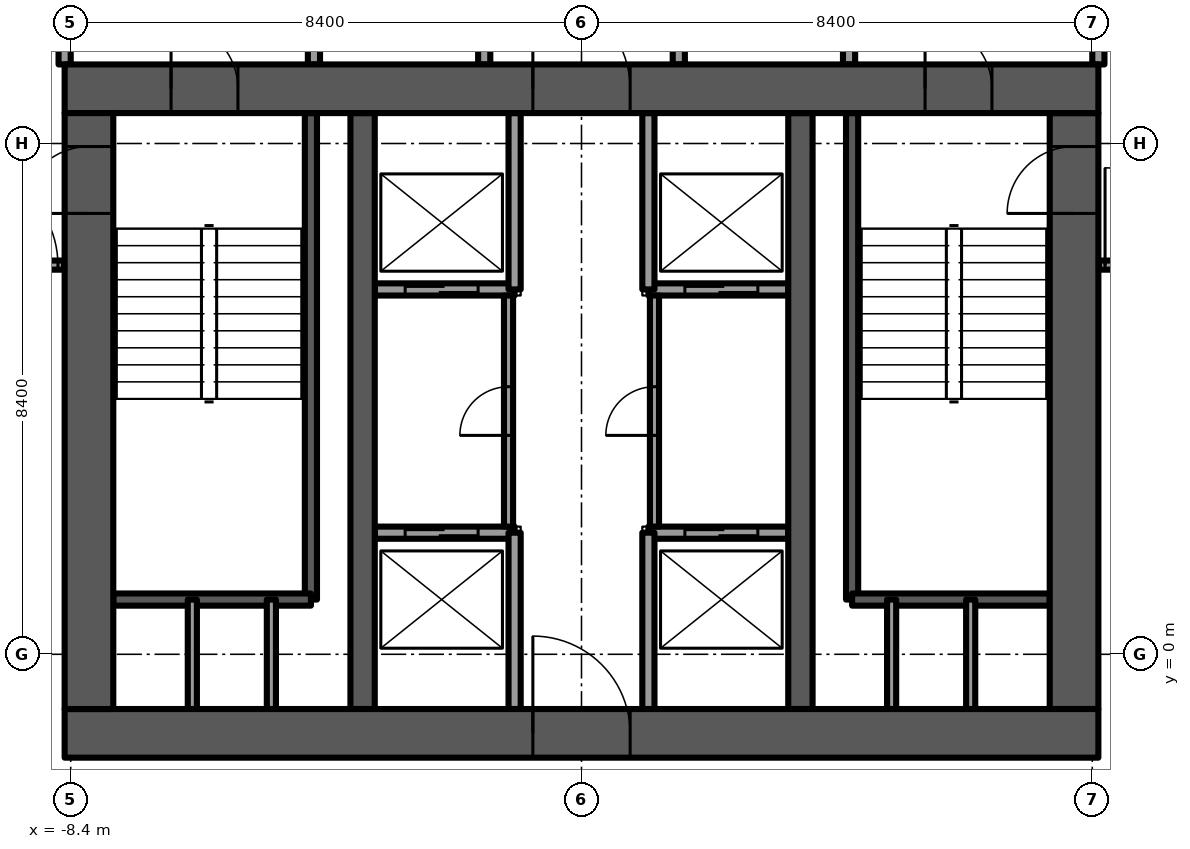
"""IFC4 building model, lengths in metres.
Left out: names, types, materials, properties, quantities, classifications, styles, units other than length and angle.
Written with IfcOpenShell. Run it as: python <this file> out.ifc"""

import sys

from ifc_helpers import new_model, si_unit, direction, frame, frame_2d, origin, place, context, subcontext, project, spatial, rectangle, extrude, element, fill, save


model = new_model("IFC4")
c1 = context("Model", 3, precision=1e-05, world=origin(), true_north=direction((0.0, 1.0)))
c2 = subcontext(c1, "Body", "Model", "MODEL_VIEW")
j1 = project(units=[si_unit("LENGTHUNIT", "METRE"), si_unit("PLANEANGLEUNIT", "RADIAN")], contexts=[c1])
p1 = place(None, origin())
s1 = spatial("IfcSite", under=j1, at=p1, CompositionType="ELEMENT")
p2 = place(p1, origin())
s2 = spatial("IfcBuilding", under=s1, at=p2, CompositionType="ELEMENT")
p3 = place(p2, frame((0.0, 0.0, 194.5)))
s3 = spatial("IfcBuildingStorey", under=s2, at=p3, CompositionType="ELEMENT", Elevation=194.5)
p4 = place(p3, frame((-8.5, -1.3, -0.3), z_axis=(0.0, 0.0, 1.0), x_axis=(1.0, 0.0, 0.0)))
e1 = element("IfcWall", 1, at=p4, inside=s3, PredefinedType="SHEAR", context=c2, shape_type="SweptSolid", body=[
    extrude(rectangle(XDim=17.0, YDim=0.8, at=frame_2d((8.5, 0.0))), origin(), (0.0, 0.0, 1.0), 3.75),
])
p5 = place(p4, frame((7.7, 0.0, 0.0)))
e2 = element("IfcOpeningElement", 2, at=p5, cuts=e1, PredefinedType="OPENING", context=c2, shape_type="SweptSolid", body=[
    extrude(rectangle(XDim=1.6, YDim=2.1, at=frame_2d((0.8, 1.05))), frame((0.0, 0.4, 0.0), z_axis=(0.0, -1.0, 0.0), x_axis=(1.0, 0.0, 0.0)), (0.0, 0.0, 1.0), 0.8),
])
p6 = place(p3, frame((-8.5, 9.3, -0.3), z_axis=(0.0, 0.0, 1.0), x_axis=(1.0, 0.0, 0.0)))
e3 = element("IfcWall", 3, at=p6, inside=s3, PredefinedType="SHEAR", context=c2, shape_type="SweptSolid", body=[
    extrude(rectangle(XDim=17.0, YDim=0.8, at=frame_2d((8.5, 0.0))), origin(), (0.0, 0.0, 1.0), 3.75),
])
p7 = place(p6, frame((7.7, 0.0, 0.0)))
e4 = element("IfcOpeningElement", 4, at=p7, cuts=e3, PredefinedType="OPENING", context=c2, shape_type="SweptSolid", body=[
    extrude(rectangle(XDim=1.6, YDim=2.1, at=frame_2d((0.8, 1.05))), frame((0.0, 0.4, 0.0), z_axis=(0.0, -1.0, 0.0), x_axis=(1.0, 0.0, 0.0)), (0.0, 0.0, 1.0), 0.8),
])
p8 = place(p6, frame((1.75, 0.0, 0.0)))
e5 = element("IfcOpeningElement", 5, at=p8, cuts=e3, PredefinedType="OPENING", context=c2, shape_type="SweptSolid", body=[
    extrude(rectangle(XDim=1.1, YDim=2.1, at=frame_2d((0.55, 1.05))), frame((0.0, 0.4, 0.0), z_axis=(0.0, -1.0, 0.0), x_axis=(1.0, 0.0, 0.0)), (0.0, 0.0, 1.0), 0.8),
])
p9 = place(p6, frame((14.15, 0.0, 0.0)))
e6 = element("IfcOpeningElement", 6, at=p9, cuts=e3, PredefinedType="OPENING", context=c2, shape_type="SweptSolid", body=[
    extrude(rectangle(XDim=1.1, YDim=2.1, at=frame_2d((0.55, 1.05))), frame((0.0, 0.4, 0.0), z_axis=(0.0, -1.0, 0.0), x_axis=(1.0, 0.0, 0.0)), (0.0, 0.0, 1.0), 0.8),
])
p10 = place(p3, frame((-8.1, -0.9, -0.3), z_axis=(0.0, 0.0, 1.0), x_axis=(0.0, 1.0, 0.0)))
e7 = element("IfcWall", 7, at=p10, inside=s3, PredefinedType="SHEAR", context=c2, shape_type="SweptSolid", body=[
    extrude(rectangle(XDim=9.8, YDim=0.8, at=frame_2d((4.9, 0.0))), origin(), (0.0, 0.0, 1.0), 3.75),
])
p11 = place(p10, frame((8.15, 0.0, 0.0)))
e8 = element("IfcOpeningElement", 8, at=p11, cuts=e7, PredefinedType="OPENING", context=c2, shape_type="SweptSolid", body=[
    extrude(rectangle(XDim=1.1, YDim=2.1, at=frame_2d((0.55, 1.05))), frame((0.0, 0.4, 0.0), z_axis=(0.0, -1.0, 0.0), x_axis=(1.0, 0.0, 0.0)), (0.0, 0.0, 1.0), 0.8),
])
p12 = place(p3, frame((8.1, -0.9, -0.3), z_axis=(0.0, 0.0, 1.0), x_axis=(0.0, 1.0, 0.0)))
e9 = element("IfcWall", 9, at=p12, inside=s3, PredefinedType="SHEAR", context=c2, shape_type="SweptSolid", body=[
    extrude(rectangle(XDim=9.8, YDim=0.8, at=frame_2d((4.9, 0.0))), origin(), (0.0, 0.0, 1.0), 3.75),
])
p13 = place(p12, frame((8.15, 0.0, 0.0)))
e10 = element("IfcOpeningElement", 10, at=p13, cuts=e9, PredefinedType="OPENING", context=c2, shape_type="SweptSolid", body=[
    extrude(rectangle(XDim=1.1, YDim=2.1, at=frame_2d((0.55, 1.05))), frame((0.0, 0.4, 0.0), z_axis=(0.0, -1.0, 0.0), x_axis=(1.0, 0.0, 0.0)), (0.0, 0.0, 1.0), 0.8),
])
for number, where, z_axis, x_axis in (
    (11, (-3.6, -0.9, -0.3), (0.0, 0.0, 1.0), (0.0, 1.0, 0.0)),
    (12, (3.6, -0.9, -0.3), (0.0, 0.0, 1.0), (0.0, 1.0, 0.0)),
):
    element("IfcWall", number, at=place(p3, frame(where, z_axis=z_axis, x_axis=x_axis)), inside=s3, PredefinedType="SHEAR", context=c2, shape_type="SweptSolid", body=[
        extrude(rectangle(XDim=9.8, YDim=0.4, at=frame_2d((4.9, 0.0))), origin(), (0.0, 0.0, 1.0), 3.75),
    ])
p14 = place(p3, frame((-3.4, 2.0, 0.0), z_axis=(0.0, 0.0, 1.0), x_axis=(1.0, 0.0, 0.0)))
e13 = element("IfcWall", 13, at=p14, inside=s3, PredefinedType="PARTITIONING", context=c2, shape_type="SweptSolid", body=[
    extrude(rectangle(XDim=2.3, YDim=0.2, at=frame_2d((1.15, 0.0))), origin(), (0.0, 0.0, 1.0), 3.45),
])
p15 = place(p14, frame((0.5, 0.0, 0.0)))
e14 = element("IfcOpeningElement", 14, at=p15, cuts=e13, PredefinedType="OPENING", context=c2, shape_type="SweptSolid", body=[
    extrude(rectangle(XDim=1.2, YDim=2.1, at=frame_2d((0.6, 1.05))), frame((0.0, 0.1, 0.0), z_axis=(0.0, -1.0, 0.0), x_axis=(1.0, 0.0, 0.0)), (0.0, 0.0, 1.0), 0.2),
])
p16 = place(p3, frame((-3.4, 6.0, 0.0), z_axis=(0.0, 0.0, 1.0), x_axis=(1.0, 0.0, 0.0)))
e15 = element("IfcWall", 15, at=p16, inside=s3, PredefinedType="PARTITIONING", context=c2, shape_type="SweptSolid", body=[
    extrude(rectangle(XDim=2.3, YDim=0.2, at=frame_2d((1.15, 0.0))), origin(), (0.0, 0.0, 1.0), 3.45),
])
p17 = place(p16, frame((0.5, 0.0, 0.0)))
e16 = element("IfcOpeningElement", 16, at=p17, cuts=e15, PredefinedType="OPENING", context=c2, shape_type="SweptSolid", body=[
    extrude(rectangle(XDim=1.2, YDim=2.1, at=frame_2d((0.6, 1.05))), frame((0.0, 0.1, 0.0), z_axis=(0.0, -1.0, 0.0), x_axis=(1.0, 0.0, 0.0)), (0.0, 0.0, 1.0), 0.2),
])
p18 = place(p3, frame((1.1, 2.0, 0.0), z_axis=(0.0, 0.0, 1.0), x_axis=(1.0, 0.0, 0.0)))
e17 = element("IfcWall", 17, at=p18, inside=s3, PredefinedType="PARTITIONING", context=c2, shape_type="SweptSolid", body=[
    extrude(rectangle(XDim=2.3, YDim=0.2, at=frame_2d((1.15, 0.0))), origin(), (0.0, 0.0, 1.0), 3.45),
])
p19 = place(p18, frame((0.6, 0.0, 0.0)))
e18 = element("IfcOpeningElement", 18, at=p19, cuts=e17, PredefinedType="OPENING", context=c2, shape_type="SweptSolid", body=[
    extrude(rectangle(XDim=1.2, YDim=2.1, at=frame_2d((0.6, 1.05))), frame((0.0, 0.1, 0.0), z_axis=(0.0, -1.0, 0.0), x_axis=(1.0, 0.0, 0.0)), (0.0, 0.0, 1.0), 0.2),
])
p20 = place(p3, frame((1.1, 6.0, 0.0), z_axis=(0.0, 0.0, 1.0), x_axis=(1.0, 0.0, 0.0)))
e19 = element("IfcWall", 19, at=p20, inside=s3, PredefinedType="PARTITIONING", context=c2, shape_type="SweptSolid", body=[
    extrude(rectangle(XDim=2.3, YDim=0.2, at=frame_2d((1.15, 0.0))), origin(), (0.0, 0.0, 1.0), 3.45),
])
p21 = place(p20, frame((0.6, 0.0, 0.0)))
e20 = element("IfcOpeningElement", 20, at=p21, cuts=e19, PredefinedType="OPENING", context=c2, shape_type="SweptSolid", body=[
    extrude(rectangle(XDim=1.2, YDim=2.1, at=frame_2d((0.6, 1.05))), frame((0.0, 0.1, 0.0), z_axis=(0.0, -1.0, 0.0), x_axis=(1.0, 0.0, 0.0)), (0.0, 0.0, 1.0), 0.2),
])
for number, where, z_axis, x_axis in (
    (21, (-1.1, -0.9, 0.0), (0.0, 0.0, 1.0), (0.0, 1.0, 0.0)),
    (22, (1.1, -0.9, 0.0), (0.0, 0.0, 1.0), (0.0, 1.0, 0.0)),
    (23, (-1.1, 6.0, 0.0), (0.0, 0.0, 1.0), (0.0, 1.0, 0.0)),
    (24, (1.1, 6.0, 0.0), (0.0, 0.0, 1.0), (0.0, 1.0, 0.0)),
):
    element("IfcWall", number, at=place(p3, frame(where, z_axis=z_axis, x_axis=x_axis)), inside=s3, PredefinedType="PARTITIONING", context=c2, shape_type="SweptSolid", body=[
        extrude(rectangle(XDim=2.9, YDim=0.2, at=frame_2d((1.45, 0.0))), origin(), (0.0, 0.0, 1.0), 3.45),
    ])
p22 = place(p3, frame((-4.45, 0.9, -0.3), z_axis=(0.0, 0.0, 1.0), x_axis=(0.0, 1.0, 0.0)))
e25 = element("IfcWall", 25, at=p22, inside=s3, PredefinedType="SOLIDWALL", context=c2, shape_type="SweptSolid", body=[
    extrude(rectangle(XDim=8.0, YDim=0.2, at=frame_2d((4.0, 0.0))), origin(), (0.0, 0.0, 1.0), 3.75),
])
p23 = place(p3, frame((-7.7, 0.9, -0.3), z_axis=(0.0, 0.0, 1.0), x_axis=(1.0, 0.0, 0.0)))
e26 = element("IfcWall", 26, at=p23, inside=s3, PredefinedType="SOLIDWALL", context=c2, shape_type="SweptSolid", body=[
    extrude(rectangle(XDim=3.25, YDim=0.2, at=frame_2d((1.625, 0.0))), origin(), (0.0, 0.0, 1.0), 3.75),
])
for number, where, z_axis, x_axis in (
    (27, (-6.4, -0.9, 0.0), (0.0, 0.0, 1.0), (0.0, 1.0, 0.0)),
    (28, (-5.1, -0.9, 0.0), (0.0, 0.0, 1.0), (0.0, 1.0, 0.0)),
):
    element("IfcWall", number, at=place(p3, frame(where, z_axis=z_axis, x_axis=x_axis)), inside=s3, PredefinedType="PARTITIONING", context=c2, shape_type="SweptSolid", body=[
        extrude(rectangle(XDim=1.8, YDim=0.15, at=frame_2d((0.9, 0.0))), origin(), (0.0, 0.0, 1.0), 3.45),
    ])
p24 = place(p3, frame((4.45, 0.9, -0.3), z_axis=(0.0, 0.0, 1.0), x_axis=(0.0, 1.0, 0.0)))
e29 = element("IfcWall", 29, at=p24, inside=s3, PredefinedType="SOLIDWALL", context=c2, shape_type="SweptSolid", body=[
    extrude(rectangle(XDim=8.0, YDim=0.2, at=frame_2d((4.0, 0.0))), origin(), (0.0, 0.0, 1.0), 3.75),
])
p25 = place(p3, frame((4.45, 0.9, -0.3), z_axis=(0.0, 0.0, 1.0), x_axis=(1.0, 0.0, 0.0)))
e30 = element("IfcWall", 30, at=p25, inside=s3, PredefinedType="SOLIDWALL", context=c2, shape_type="SweptSolid", body=[
    extrude(rectangle(XDim=3.25, YDim=0.2, at=frame_2d((1.625, 0.0))), origin(), (0.0, 0.0, 1.0), 3.75),
])
for number, where, z_axis, x_axis in (
    (31, (5.1, -0.9, 0.0), (0.0, 0.0, 1.0), (0.0, 1.0, 0.0)),
    (32, (6.4, -0.9, 0.0), (0.0, 0.0, 1.0), (0.0, 1.0, 0.0)),
):
    element("IfcWall", number, at=place(p3, frame(where, z_axis=z_axis, x_axis=x_axis)), inside=s3, PredefinedType="PARTITIONING", context=c2, shape_type="SweptSolid", body=[
        extrude(rectangle(XDim=1.8, YDim=0.15, at=frame_2d((0.9, 0.0))), origin(), (0.0, 0.0, 1.0), 3.45),
    ])
p26 = place(p3, frame((-8.5, 9.7, 0.0), z_axis=(0.0, 0.0, 1.0), x_axis=(0.0, 1.0, 0.0)))
e33 = element("IfcWall", 33, at=p26, inside=s3, PredefinedType="PARTITIONING", context=c2, shape_type="SweptSolid", body=[
    extrude(rectangle(XDim=3.9, YDim=0.2, at=frame_2d((1.95, 0.0))), origin(), (0.0, 0.0, 1.0), 3.45),
])
p27 = place(p26, frame((1.35, 0.0, 0.0)))
e34 = element("IfcOpeningElement", 34, at=p27, cuts=e33, PredefinedType="OPENING", context=c2, shape_type="SweptSolid", body=[
    extrude(rectangle(XDim=1.2, YDim=2.1, at=frame_2d((0.6, 1.05))), frame((0.0, 0.1, 0.0), z_axis=(0.0, -1.0, 0.0), x_axis=(1.0, 0.0, 0.0)), (0.0, 0.0, 1.0), 0.2),
])
p28 = place(p3, frame((8.5, 9.7, 0.0), z_axis=(0.0, 0.0, 1.0), x_axis=(0.0, 1.0, 0.0)))
e35 = element("IfcWall", 35, at=p28, inside=s3, PredefinedType="PARTITIONING", context=c2, shape_type="SweptSolid", body=[
    extrude(rectangle(XDim=3.9, YDim=0.2, at=frame_2d((1.95, 0.0))), origin(), (0.0, 0.0, 1.0), 3.45),
])
p29 = place(p28, frame((1.35, 0.0, 0.0)))
e36 = element("IfcOpeningElement", 36, at=p29, cuts=e35, PredefinedType="OPENING", context=c2, shape_type="SweptSolid", body=[
    extrude(rectangle(XDim=1.2, YDim=2.1, at=frame_2d((0.6, 1.05))), frame((0.0, 0.1, 0.0), z_axis=(0.0, -1.0, 0.0), x_axis=(1.0, 0.0, 0.0)), (0.0, 0.0, 1.0), 0.2),
])
p30 = place(p3, frame((-4.4, 9.7, 0.0), z_axis=(0.0, 0.0, 1.0), x_axis=(0.0, 1.0, 0.0)))
e37 = element("IfcWall", 37, at=p30, inside=s3, PredefinedType="PARTITIONING", context=c2, shape_type="SweptSolid", body=[
    extrude(rectangle(XDim=3.9, YDim=0.2, at=frame_2d((1.95, 0.0))), origin(), (0.0, 0.0, 1.0), 3.45),
])
p31 = place(p30, frame((1.35, 0.0, 0.0)))
e38 = element("IfcOpeningElement", 38, at=p31, cuts=e37, PredefinedType="OPENING", context=c2, shape_type="SweptSolid", body=[
    extrude(rectangle(XDim=1.2, YDim=2.1, at=frame_2d((0.6, 1.05))), frame((0.0, 0.1, 0.0), z_axis=(0.0, -1.0, 0.0), x_axis=(1.0, 0.0, 0.0)), (0.0, 0.0, 1.0), 0.2),
])
p32 = place(p3, frame((4.4, 9.7, 0.0), z_axis=(0.0, 0.0, 1.0), x_axis=(0.0, 1.0, 0.0)))
e39 = element("IfcWall", 39, at=p32, inside=s3, PredefinedType="PARTITIONING", context=c2, shape_type="SweptSolid", body=[
    extrude(rectangle(XDim=3.9, YDim=0.2, at=frame_2d((1.95, 0.0))), origin(), (0.0, 0.0, 1.0), 3.45),
])
p33 = place(p32, frame((1.35, 0.0, 0.0)))
e40 = element("IfcOpeningElement", 40, at=p33, cuts=e39, PredefinedType="OPENING", context=c2, shape_type="SweptSolid", body=[
    extrude(rectangle(XDim=1.2, YDim=2.1, at=frame_2d((0.6, 1.05))), frame((0.0, 0.1, 0.0), z_axis=(0.0, -1.0, 0.0), x_axis=(1.0, 0.0, 0.0)), (0.0, 0.0, 1.0), 0.2),
])
for number, where, z_axis, x_axis in (
    (41, (-1.6, 9.7, 0.0), (0.0, 0.0, 1.0), (0.0, 1.0, 0.0)),
    (42, (1.6, 9.7, 0.0), (0.0, 0.0, 1.0), (0.0, 1.0, 0.0)),
):
    element("IfcWall", number, at=place(p3, frame(where, z_axis=z_axis, x_axis=x_axis)), inside=s3, PredefinedType="PARTITIONING", context=c2, shape_type="SweptSolid", body=[
        extrude(rectangle(XDim=3.9, YDim=0.2, at=frame_2d((1.95, 0.0))), origin(), (0.0, 0.0, 1.0), 3.45),
    ])
p34 = place(p3, frame((-1.2, 2.1, 0.0), z_axis=(0.0, 0.0, 1.0), x_axis=(0.0, 1.0, 0.0)))
e43 = element("IfcWall", 43, at=p34, inside=s3, PredefinedType="PARTITIONING", context=c2, shape_type="SweptSolid", body=[
    extrude(rectangle(XDim=3.8, YDim=0.15, at=frame_2d((1.9, 0.0))), origin(), (0.0, 0.0, 1.0), 3.45),
])
p35 = place(p34, frame((1.5, 0.0, 0.0)))
e44 = element("IfcOpeningElement", 44, at=p35, cuts=e43, PredefinedType="OPENING", context=c2, shape_type="SweptSolid", body=[
    extrude(rectangle(XDim=0.8, YDim=2.1, at=frame_2d((0.4, 1.05))), frame((0.0, 0.075, 0.0), z_axis=(0.0, -1.0, 0.0), x_axis=(1.0, 0.0, 0.0)), (0.0, 0.0, 1.0), 0.15),
])
p36 = place(p3, frame((1.2, 2.1, 0.0), z_axis=(0.0, 0.0, 1.0), x_axis=(0.0, 1.0, 0.0)))
e45 = element("IfcWall", 45, at=p36, inside=s3, PredefinedType="PARTITIONING", context=c2, shape_type="SweptSolid", body=[
    extrude(rectangle(XDim=3.8, YDim=0.15, at=frame_2d((1.9, 0.0))), origin(), (0.0, 0.0, 1.0), 3.45),
])
p37 = place(p36, frame((1.5, 0.0, 0.0)))
e46 = element("IfcOpeningElement", 46, at=p37, cuts=e45, PredefinedType="OPENING", context=c2, shape_type="SweptSolid", body=[
    extrude(rectangle(XDim=0.8, YDim=2.1, at=frame_2d((0.4, 1.05))), frame((0.0, 0.075, 0.0), z_axis=(0.0, -1.0, 0.0), x_axis=(1.0, 0.0, 0.0)), (0.0, 0.0, 1.0), 0.15),
])
p38 = place(p3, frame((-11.93, 6.4, 0.0), z_axis=(0.0, 0.0, 1.0), x_axis=(1.0, 0.0, 0.0)))
e47 = element("IfcWall", 47, at=p38, inside=s3, PredefinedType="PARTITIONING", context=c2, shape_type="SweptSolid", body=[
    extrude(rectangle(XDim=3.42, YDim=0.15, at=frame_2d((1.71, 0.0))), origin(), (0.0, 0.0, 1.0), 3.45),
])
p39 = place(p38, frame((1.72, 0.0, 0.0)))
e48 = element("IfcOpeningElement", 48, at=p39, cuts=e47, PredefinedType="OPENING", context=c2, shape_type="SweptSolid", body=[
    extrude(rectangle(XDim=1.6, YDim=2.1, at=frame_2d((0.8, 1.05))), frame((0.0, 0.075, 0.0), z_axis=(0.0, -1.0, 0.0), x_axis=(1.0, 0.0, 0.0)), (0.0, 0.0, 1.0), 0.15),
])
p40 = place(p3, frame((8.51, 6.4, 0.0), z_axis=(0.0, 0.0, 1.0), x_axis=(1.0, 0.0, 0.0)))
e49 = element("IfcWall", 49, at=p40, inside=s3, PredefinedType="PARTITIONING", context=c2, shape_type="SweptSolid", body=[
    extrude(rectangle(XDim=3.42, YDim=0.15, at=frame_2d((1.71, 0.0))), origin(), (0.0, 0.0, 1.0), 3.45),
])
p41 = place(p40, frame((0.1, 0.0, 0.0)))
e50 = element("IfcOpeningElement", 50, at=p41, cuts=e49, PredefinedType="OPENING", context=c2, shape_type="SweptSolid", body=[
    extrude(rectangle(XDim=1.6, YDim=2.1, at=frame_2d((0.8, 1.05))), frame((0.0, 0.075, 0.0), z_axis=(0.0, -1.0, 0.0), x_axis=(1.0, 0.0, 0.0)), (0.0, 0.0, 1.0), 0.15),
])
p42 = place(p15, origin())
e51 = element("IfcDoor", 51, at=p42, inside=s3, OperationType="SLIDING_TO_LEFT", PredefinedType="DOOR", context=c2, shape_type="SweptSolid", body=[
    extrude(rectangle(XDim=1.2, YDim=2.1, at=frame_2d((0.6, 1.05))), frame((0.0, 0.025, 0.0), z_axis=(0.0, -1.0, 0.0), x_axis=(1.0, 0.0, 0.0)), (0.0, 0.0, 1.0), 0.05),
])
fill(e14, e51)
p43 = place(p19, origin())
e52 = element("IfcDoor", 52, at=p43, inside=s3, OperationType="SLIDING_TO_LEFT", PredefinedType="DOOR", context=c2, shape_type="SweptSolid", body=[
    extrude(rectangle(XDim=1.2, YDim=2.1, at=frame_2d((0.6, 1.05))), frame((0.0, 0.025, 0.0), z_axis=(0.0, -1.0, 0.0), x_axis=(1.0, 0.0, 0.0)), (0.0, 0.0, 1.0), 0.05),
])
fill(e18, e52)
p44 = place(p17, origin())
e53 = element("IfcDoor", 53, at=p44, inside=s3, OperationType="SLIDING_TO_LEFT", PredefinedType="DOOR", context=c2, shape_type="SweptSolid", body=[
    extrude(rectangle(XDim=1.2, YDim=2.1, at=frame_2d((0.6, 1.05))), frame((0.0, 0.025, 0.0), z_axis=(0.0, -1.0, 0.0), x_axis=(1.0, 0.0, 0.0)), (0.0, 0.0, 1.0), 0.05),
])
fill(e16, e53)
p45 = place(p21, origin())
e54 = element("IfcDoor", 54, at=p45, inside=s3, OperationType="SLIDING_TO_LEFT", PredefinedType="DOOR", context=c2, shape_type="SweptSolid", body=[
    extrude(rectangle(XDim=1.2, YDim=2.1, at=frame_2d((0.6, 1.05))), frame((0.0, 0.025, 0.0), z_axis=(0.0, -1.0, 0.0), x_axis=(1.0, 0.0, 0.0)), (0.0, 0.0, 1.0), 0.05),
])
fill(e20, e54)
p46 = place(p5, origin())
e55 = element("IfcDoor", 55, at=p46, inside=s3, OperationType="DOUBLE_DOOR_SINGLE_SWING", PredefinedType="DOOR", context=c2, shape_type="SweptSolid", body=[
    extrude(rectangle(XDim=1.6, YDim=2.1, at=frame_2d((0.8, 1.05))), frame((0.0, 0.025, 0.0), z_axis=(0.0, -1.0, 0.0), x_axis=(1.0, 0.0, 0.0)), (0.0, 0.0, 1.0), 0.05),
])
fill(e2, e55)
p47 = place(p7, origin())
e56 = element("IfcDoor", 56, at=p47, inside=s3, OperationType="DOUBLE_DOOR_SINGLE_SWING", PredefinedType="DOOR", context=c2, shape_type="SweptSolid", body=[
    extrude(rectangle(XDim=1.6, YDim=2.1, at=frame_2d((0.8, 1.05))), frame((0.0, 0.025, 0.0), z_axis=(0.0, -1.0, 0.0), x_axis=(1.0, 0.0, 0.0)), (0.0, 0.0, 1.0), 0.05),
])
fill(e4, e56)
p48 = place(p8, origin())
e57 = element("IfcDoor", 57, at=p48, inside=s3, OperationType="SINGLE_SWING_LEFT", PredefinedType="DOOR", context=c2, shape_type="SweptSolid", body=[
    extrude(rectangle(XDim=1.1, YDim=2.1, at=frame_2d((0.55, 1.05))), frame((0.0, 0.025, 0.0), z_axis=(0.0, -1.0, 0.0), x_axis=(1.0, 0.0, 0.0)), (0.0, 0.0, 1.0), 0.05),
])
fill(e5, e57)
p49 = place(p11, origin())
e58 = element("IfcDoor", 58, at=p49, inside=s3, OperationType="SINGLE_SWING_RIGHT", PredefinedType="DOOR", context=c2, shape_type="SweptSolid", body=[
    extrude(rectangle(XDim=1.1, YDim=2.1, at=frame_2d((0.55, 1.05))), frame((0.0, 0.025, 0.0), z_axis=(0.0, -1.0, 0.0), x_axis=(1.0, 0.0, 0.0)), (0.0, 0.0, 1.0), 0.05),
])
fill(e8, e58)
p50 = place(p9, origin())
e59 = element("IfcDoor", 59, at=p50, inside=s3, OperationType="SINGLE_SWING_RIGHT", PredefinedType="DOOR", context=c2, shape_type="SweptSolid", body=[
    extrude(rectangle(XDim=1.1, YDim=2.1, at=frame_2d((0.55, 1.05))), frame((0.0, 0.025, 0.0), z_axis=(0.0, -1.0, 0.0), x_axis=(1.0, 0.0, 0.0)), (0.0, 0.0, 1.0), 0.05),
])
fill(e6, e59)
p51 = place(p13, origin())
e60 = element("IfcDoor", 60, at=p51, inside=s3, OperationType="SINGLE_SWING_LEFT", PredefinedType="DOOR", context=c2, shape_type="SweptSolid", body=[
    extrude(rectangle(XDim=1.1, YDim=2.1, at=frame_2d((0.55, 1.05))), frame((0.0, 0.025, 0.0), z_axis=(0.0, -1.0, 0.0), x_axis=(1.0, 0.0, 0.0)), (0.0, 0.0, 1.0), 0.05),
])
fill(e10, e60)
p52 = place(p35, origin())
e61 = element("IfcDoor", 61, at=p52, inside=s3, OperationType="SINGLE_SWING_LEFT", PredefinedType="DOOR", context=c2, shape_type="SweptSolid", body=[
    extrude(rectangle(XDim=0.8, YDim=2.1, at=frame_2d((0.4, 1.05))), frame((0.0, 0.025, 0.0), z_axis=(0.0, -1.0, 0.0), x_axis=(1.0, 0.0, 0.0)), (0.0, 0.0, 1.0), 0.05),
])
fill(e44, e61)
p53 = place(p37, origin())
e62 = element("IfcDoor", 62, at=p53, inside=s3, OperationType="SINGLE_SWING_RIGHT", PredefinedType="DOOR", context=c2, shape_type="SweptSolid", body=[
    extrude(rectangle(XDim=0.8, YDim=2.1, at=frame_2d((0.4, 1.05))), frame((0.0, 0.025, 0.0), z_axis=(0.0, -1.0, 0.0), x_axis=(1.0, 0.0, 0.0)), (0.0, 0.0, 1.0), 0.05),
])
fill(e46, e62)
p54 = place(p39, origin())
e63 = element("IfcDoor", 63, at=p54, inside=s3, OperationType="DOUBLE_DOOR_SINGLE_SWING", PredefinedType="DOOR", context=c2, shape_type="SweptSolid", body=[
    extrude(rectangle(XDim=1.6, YDim=2.1, at=frame_2d((0.8, 1.05))), frame((0.0, 0.025, 0.0), z_axis=(0.0, -1.0, 0.0), x_axis=(1.0, 0.0, 0.0)), (0.0, 0.0, 1.0), 0.05),
])
fill(e48, e63)
p55 = place(p41, origin())
e64 = element("IfcDoor", 64, at=p55, inside=s3, OperationType="DOUBLE_DOOR_SINGLE_SWING", PredefinedType="DOOR", context=c2, shape_type="SweptSolid", body=[
    extrude(rectangle(XDim=1.6, YDim=2.1, at=frame_2d((0.8, 1.05))), frame((0.0, 0.025, 0.0), z_axis=(0.0, -1.0, 0.0), x_axis=(1.0, 0.0, 0.0)), (0.0, 0.0, 1.0), 0.05),
])
fill(e50, e64)
save(model, sys.argv[1])
